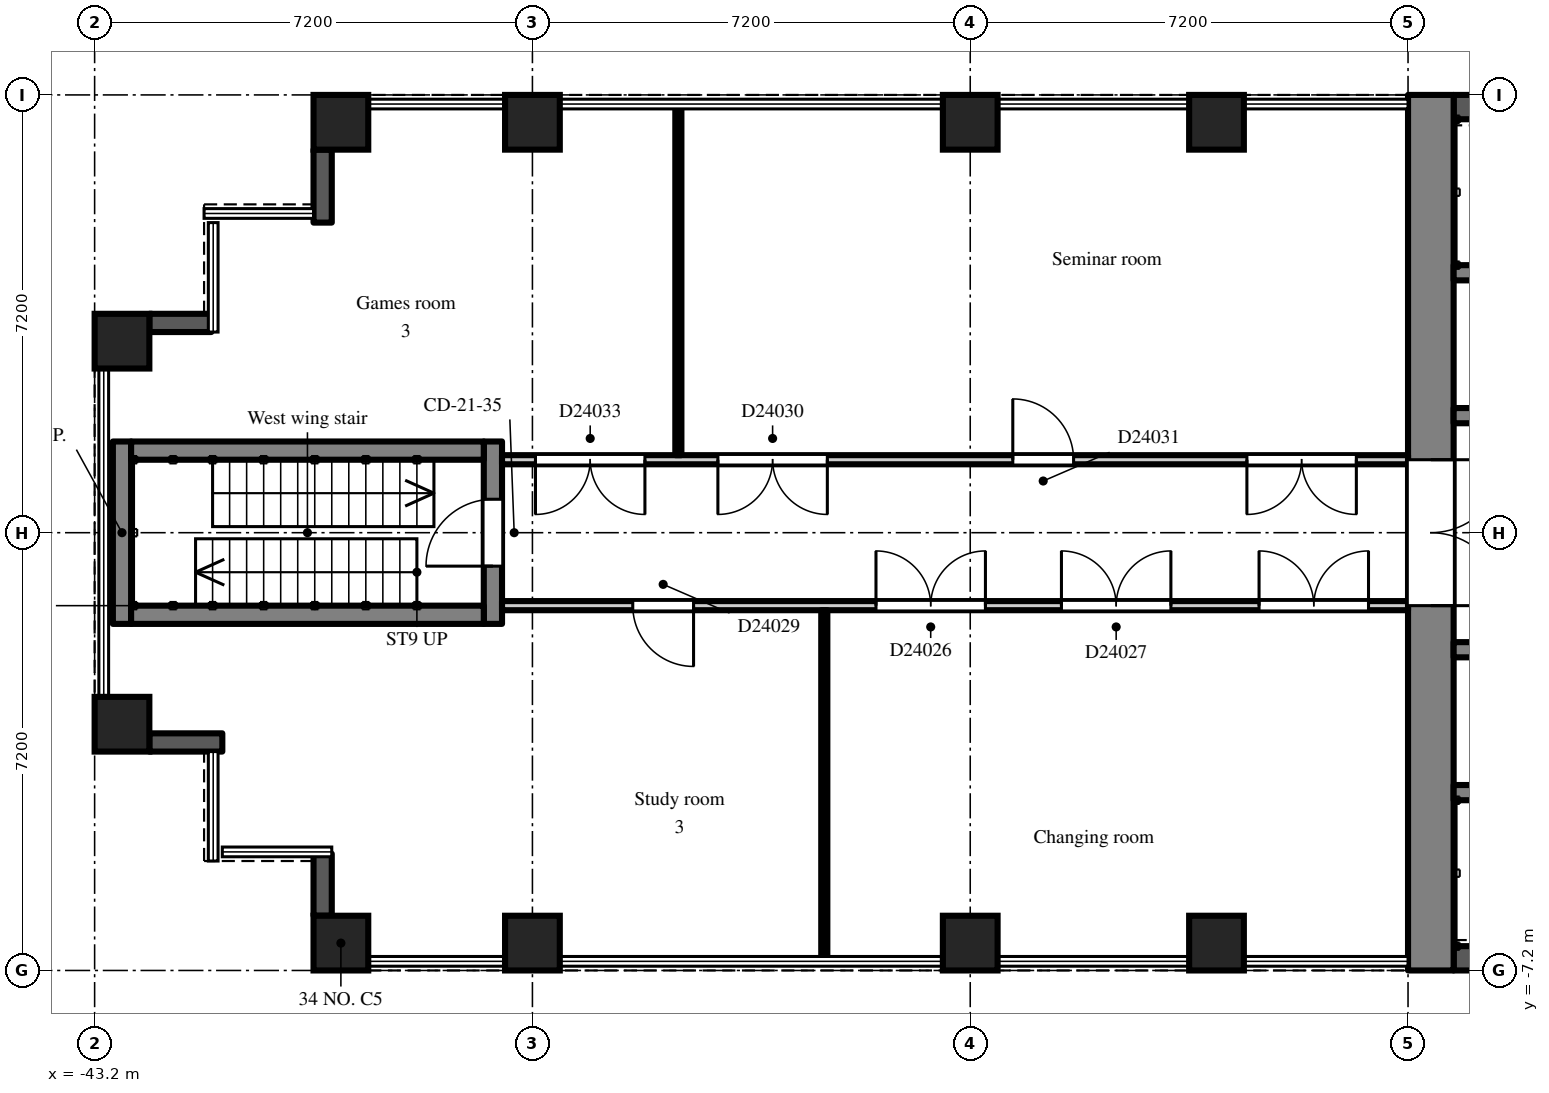
"""IFC4 building model, lengths in metres.
Left out: names, types, materials, properties, quantities, classifications, styles, units other than length and angle.
Written with IfcOpenShell. Run it as: python <this file> out.ifc"""

import sys

from ifc_helpers import new_model, si_unit, direction, frame, frame_2d, origin, origin_2d, place, context, subcontext, project, spatial, rectangle, extrude, element, fill, save


model = new_model("IFC4")
c1 = context("Model", 3, precision=1e-05, world=origin(), true_north=direction((0.0, 1.0)))
c2 = subcontext(c1, "Body", "Model", "MODEL_VIEW")
j1 = project(units=[si_unit("LENGTHUNIT", "METRE"), si_unit("PLANEANGLEUNIT", "RADIAN")], contexts=[c1])
p1 = place(None, origin())
s1 = spatial("IfcSite", under=j1, at=p1, CompositionType="ELEMENT")
p2 = place(p1, origin())
s2 = spatial("IfcBuilding", under=s1, at=p2, CompositionType="ELEMENT")
p3 = place(p2, frame((0.0, 0.0, 166.5)))
s3 = spatial("IfcBuildingStorey", under=s2, at=p3, CompositionType="ELEMENT", Elevation=166.5)
for number, where, z_axis, x_axis in (
    (1, (-42.75, -3.15, 0.0), (0.0, 0.0, 1.0), (1.0, 0.0, 0.0)),
    (2, (-42.75, 3.15, 0.0), (0.0, 0.0, 1.0), (1.0, 0.0, 0.0)),
    (3, (-39.15, -6.75, 0.0), (0.0, 0.0, 1.0), (1.0, 0.0, 0.0)),
    (4, (-39.15, 6.75, 0.0), (0.0, 0.0, 1.0), (1.0, 0.0, 0.0)),
    (5, (-36.0, -6.75, 0.0), (0.0, 0.0, 1.0), (1.0, 0.0, 0.0)),
    (6, (-36.0, 6.75, 0.0), (0.0, 0.0, 1.0), (1.0, 0.0, 0.0)),
    (7, (-28.8, -6.75, 0.0), (0.0, 0.0, 1.0), (1.0, 0.0, 0.0)),
    (8, (-28.8, 6.75, 0.0), (0.0, 0.0, 1.0), (1.0, 0.0, 0.0)),
    (9, (-24.75, -6.75, 0.0), (0.0, 0.0, 1.0), (1.0, 0.0, 0.0)),
    (10, (-24.75, 6.75, 0.0), (0.0, 0.0, 1.0), (1.0, 0.0, 0.0)),
):
    element("IfcColumn", number, at=place(p3, frame(where, z_axis=z_axis, x_axis=x_axis)), inside=s3, PredefinedType="COLUMN", context=c2, shape_type="SweptSolid", body=[
        extrude(rectangle(XDim=0.9, YDim=0.9, at=origin_2d()), origin(), (0.0, 0.0, 1.0), 4.2),
    ])
p4 = place(p3, frame((-39.45, 6.3, 0.0), z_axis=(0.0, 0.0, 1.0), x_axis=(0.0, -1.0, 0.0)))
e11 = element("IfcWall", 11, at=p4, inside=s3, PredefinedType="SOLIDWALL", context=c2, shape_type="SweptSolid", body=[
    extrude(rectangle(XDim=1.2, YDim=0.3, at=frame_2d((0.6, 0.0))), origin(), (0.0, 0.0, 1.0), 3.8),
])
p5 = place(p3, frame((-41.28, 3.45, 0.0), z_axis=(0.0, 0.0, 1.0), x_axis=(-1.0, 0.0, 0.0)))
e12 = element("IfcWall", 12, at=p5, inside=s3, PredefinedType="SOLIDWALL", context=c2, shape_type="SweptSolid", body=[
    extrude(rectangle(XDim=1.02, YDim=0.3, at=frame_2d((0.51, 0.0))), origin(), (0.0, 0.0, 1.0), 3.8),
])
p6 = place(p3, frame((-42.3, -3.45, 0.0), z_axis=(0.0, 0.0, 1.0), x_axis=(1.0, 0.0, 0.0)))
e13 = element("IfcWall", 13, at=p6, inside=s3, PredefinedType="SOLIDWALL", context=c2, shape_type="SweptSolid", body=[
    extrude(rectangle(XDim=1.2, YDim=0.3, at=frame_2d((0.6, 0.0))), origin(), (0.0, 0.0, 1.0), 3.8),
])
p7 = place(p3, frame((-39.45, -5.28, 0.0), z_axis=(0.0, 0.0, 1.0), x_axis=(0.0, -1.0, 0.0)))
e14 = element("IfcWall", 14, at=p7, inside=s3, PredefinedType="SOLIDWALL", context=c2, shape_type="SweptSolid", body=[
    extrude(rectangle(XDim=1.02, YDim=0.3, at=frame_2d((0.51, 0.0))), origin(), (0.0, 0.0, 1.0), 3.8),
])
p8 = place(p3, frame((-21.225, -7.2, 0.0), z_axis=(0.0, 0.0, 1.0), x_axis=(0.0, 1.0, 0.0)))
e15 = element("IfcWall", 15, at=p8, inside=s3, PredefinedType="SHEAR", context=c2, shape_type="SweptSolid", body=[
    extrude(rectangle(XDim=14.4, YDim=0.75, at=frame_2d((7.2, 0.0))), origin(), (0.0, 0.0, 1.0), 3.8),
])
p9 = place(p8, frame((6.0, 0.0, 0.0)))
e16 = element("IfcOpeningElement", 16, at=p9, cuts=e15, PredefinedType="OPENING", context=c2, shape_type="SweptSolid", body=[
    extrude(rectangle(XDim=2.4, YDim=2.2, at=frame_2d((1.2, 1.1))), frame((0.0, 0.385, 0.0), z_axis=(0.0, -1.0, 0.0), x_axis=(1.0, 0.0, 0.0)), (0.0, 0.0, 1.0), 0.77),
])
p10 = place(p3, frame((-7.9, 7.0, 0.0), z_axis=(0.0, 0.0, 1.0), x_axis=(-1.0, 0.0, 0.0)))
e17 = element("IfcWall", 17, at=p10, inside=s3, PredefinedType="SHEAR", context=c2, shape_type="SweptSolid", body=[
    extrude(rectangle(XDim=12.95, YDim=0.4, at=frame_2d((6.475, 0.0))), origin(), (0.0, 0.0, 1.0), 3.8),
])
p11 = place(p3, frame((-7.9, 1.925, 0.0), z_axis=(0.0, 0.0, 1.0), x_axis=(-1.0, 0.0, 0.0)))
e18 = element("IfcWall", 18, at=p11, inside=s3, PredefinedType="SHEAR", context=c2, shape_type="SweptSolid", body=[
    extrude(rectangle(XDim=12.95, YDim=0.25, at=frame_2d((6.475, 0.0))), origin(), (0.0, 0.0, 1.0), 3.8),
])
p12 = place(p11, frame((4.825, 0.0, 0.0)))
e19 = element("IfcOpeningElement", 19, at=p12, cuts=e18, PredefinedType="OPENING", context=c2, shape_type="SweptSolid", body=[
    extrude(rectangle(XDim=1.1, YDim=2.1, at=frame_2d((0.55, 1.05))), frame((0.0, 0.135, 0.0), z_axis=(0.0, -1.0, 0.0), x_axis=(1.0, 0.0, 0.0)), (0.0, 0.0, 1.0), 0.27),
])
p13 = place(p11, frame((7.025, 0.0, 0.0)))
e20 = element("IfcOpeningElement", 20, at=p13, cuts=e18, PredefinedType="OPENING", context=c2, shape_type="SweptSolid", body=[
    extrude(rectangle(XDim=1.1, YDim=2.1, at=frame_2d((0.55, 1.05))), frame((0.0, 0.135, 0.0), z_axis=(0.0, -1.0, 0.0), x_axis=(1.0, 0.0, 0.0)), (0.0, 0.0, 1.0), 0.27),
])
p14 = place(p11, frame((9.225, 0.0, 0.0)))
e21 = element("IfcOpeningElement", 21, at=p14, cuts=e18, PredefinedType="OPENING", context=c2, shape_type="SweptSolid", body=[
    extrude(rectangle(XDim=1.1, YDim=2.1, at=frame_2d((0.55, 1.05))), frame((0.0, 0.135, 0.0), z_axis=(0.0, -1.0, 0.0), x_axis=(1.0, 0.0, 0.0)), (0.0, 0.0, 1.0), 0.27),
])
p15 = place(p11, frame((0.525, 0.0, 0.0)))
e22 = element("IfcOpeningElement", 22, at=p15, cuts=e18, PredefinedType="OPENING", context=c2, shape_type="SweptSolid", body=[
    extrude(rectangle(XDim=0.9, YDim=2.1, at=frame_2d((0.45, 1.05))), frame((0.0, 0.135, 0.0), z_axis=(0.0, -1.0, 0.0), x_axis=(1.0, 0.0, 0.0)), (0.0, 0.0, 1.0), 0.27),
])
p16 = place(p11, frame((2.575, 0.0, 0.0)))
e23 = element("IfcOpeningElement", 23, at=p16, cuts=e18, PredefinedType="OPENING", context=c2, shape_type="SweptSolid", body=[
    extrude(rectangle(XDim=1.2, YDim=2.1, at=frame_2d((0.6, 1.05))), frame((0.0, 0.135, 0.0), z_axis=(0.0, -1.0, 0.0), x_axis=(1.0, 0.0, 0.0)), (0.0, 0.0, 1.0), 0.27),
])
p17 = place(p11, frame((11.525, 0.0, 0.0)))
e24 = element("IfcOpeningElement", 24, at=p17, cuts=e18, PredefinedType="OPENING", context=c2, shape_type="SweptSolid", body=[
    extrude(rectangle(XDim=0.9, YDim=2.1, at=frame_2d((0.45, 1.05))), frame((0.0, 0.135, 0.0), z_axis=(0.0, -1.0, 0.0), x_axis=(1.0, 0.0, 0.0)), (0.0, 0.0, 1.0), 0.27),
])
p18 = place(p3, frame((-12.3, 4.275, 0.0), z_axis=(0.0, 0.0, 1.0), x_axis=(-1.0, 0.0, 0.0)))
e25 = element("IfcWall", 25, at=p18, inside=s3, PredefinedType="SHEAR", context=c2, shape_type="SweptSolid", body=[
    extrude(rectangle(XDim=8.55, YDim=0.25, at=frame_2d((4.275, 0.0))), origin(), (0.0, 0.0, 1.0), 3.8),
])
p19 = place(p3, frame((-7.9, -7.0, 0.0), z_axis=(0.0, 0.0, 1.0), x_axis=(-1.0, 0.0, 0.0)))
e26 = element("IfcWall", 26, at=p19, inside=s3, PredefinedType="SHEAR", context=c2, shape_type="SweptSolid", body=[
    extrude(rectangle(XDim=12.95, YDim=0.4, at=frame_2d((6.475, 0.0))), origin(), (0.0, 0.0, 1.0), 3.8),
])
p20 = place(p3, frame((-7.9, -1.925, 0.0), z_axis=(0.0, 0.0, 1.0), x_axis=(-1.0, 0.0, 0.0)))
e27 = element("IfcWall", 27, at=p20, inside=s3, PredefinedType="SHEAR", context=c2, shape_type="SweptSolid", body=[
    extrude(rectangle(XDim=12.95, YDim=0.25, at=frame_2d((6.475, 0.0))), origin(), (0.0, 0.0, 1.0), 3.8),
])
p21 = place(p20, frame((0.525, 0.0, 0.0)))
e28 = element("IfcOpeningElement", 28, at=p21, cuts=e27, PredefinedType="OPENING", context=c2, shape_type="SweptSolid", body=[
    extrude(rectangle(XDim=0.9, YDim=2.1, at=frame_2d((0.45, 1.05))), frame((0.0, 0.135, 0.0), z_axis=(0.0, -1.0, 0.0), x_axis=(1.0, 0.0, 0.0)), (0.0, 0.0, 1.0), 0.27),
])
p22 = place(p20, frame((2.575, 0.0, 0.0)))
e29 = element("IfcOpeningElement", 29, at=p22, cuts=e27, PredefinedType="OPENING", context=c2, shape_type="SweptSolid", body=[
    extrude(rectangle(XDim=1.2, YDim=2.1, at=frame_2d((0.6, 1.05))), frame((0.0, 0.135, 0.0), z_axis=(0.0, -1.0, 0.0), x_axis=(1.0, 0.0, 0.0)), (0.0, 0.0, 1.0), 0.27),
])
p23 = place(p20, frame((4.925, 0.0, 0.0)))
e30 = element("IfcOpeningElement", 30, at=p23, cuts=e27, PredefinedType="OPENING", context=c2, shape_type="SweptSolid", body=[
    extrude(rectangle(XDim=0.9, YDim=2.1, at=frame_2d((0.45, 1.05))), frame((0.0, 0.135, 0.0), z_axis=(0.0, -1.0, 0.0), x_axis=(1.0, 0.0, 0.0)), (0.0, 0.0, 1.0), 0.27),
])
p24 = place(p20, frame((8.225, 0.0, 0.0)))
e31 = element("IfcOpeningElement", 31, at=p24, cuts=e27, PredefinedType="OPENING", context=c2, shape_type="SweptSolid", body=[
    extrude(rectangle(XDim=0.9, YDim=2.1, at=frame_2d((0.45, 1.05))), frame((0.0, 0.135, 0.0), z_axis=(0.0, -1.0, 0.0), x_axis=(1.0, 0.0, 0.0)), (0.0, 0.0, 1.0), 0.27),
])
p25 = place(p20, frame((11.525, 0.0, 0.0)))
e32 = element("IfcOpeningElement", 32, at=p25, cuts=e27, PredefinedType="OPENING", context=c2, shape_type="SweptSolid", body=[
    extrude(rectangle(XDim=0.9, YDim=2.1, at=frame_2d((0.45, 1.05))), frame((0.0, 0.135, 0.0), z_axis=(0.0, -1.0, 0.0), x_axis=(1.0, 0.0, 0.0)), (0.0, 0.0, 1.0), 0.27),
])
p26 = place(p3, frame((-12.3, -4.275, 0.0), z_axis=(0.0, 0.0, 1.0), x_axis=(-1.0, 0.0, 0.0)))
e33 = element("IfcWall", 33, at=p26, inside=s3, PredefinedType="SHEAR", context=c2, shape_type="SweptSolid", body=[
    extrude(rectangle(XDim=8.55, YDim=0.25, at=frame_2d((4.275, 0.0))), origin(), (0.0, 0.0, 1.0), 3.8),
])
p27 = place(p3, frame((-36.65, -1.5, 0.0), z_axis=(0.0, 0.0, 1.0), x_axis=(0.0, 1.0, 0.0)))
e34 = element("IfcWall", 34, at=p27, inside=s3, PredefinedType="SHEAR", context=c2, shape_type="SweptSolid", body=[
    extrude(rectangle(XDim=3.0, YDim=0.3, at=frame_2d((1.5, 0.0))), origin(), (0.0, 0.0, 1.0), 3.8),
])
p28 = place(p27, frame((0.95, 0.0, 0.0)))
e35 = element("IfcOpeningElement", 35, at=p28, cuts=e34, PredefinedType="OPENING", context=c2, shape_type="SweptSolid", body=[
    extrude(rectangle(XDim=1.1, YDim=2.1, at=frame_2d((0.55, 1.05))), frame((0.0, 0.16, 0.0), z_axis=(0.0, -1.0, 0.0), x_axis=(1.0, 0.0, 0.0)), (0.0, 0.0, 1.0), 0.32),
])
p29 = place(p3, frame((-42.75, -1.5, 0.0), z_axis=(0.0, 0.0, 1.0), x_axis=(0.0, 1.0, 0.0)))
e36 = element("IfcWall", 36, at=p29, inside=s3, PredefinedType="SHEAR", context=c2, shape_type="SweptSolid", body=[
    extrude(rectangle(XDim=3.0, YDim=0.3, at=frame_2d((1.5, 0.0))), origin(), (0.0, 0.0, 1.0), 3.8),
])
for number, where, z_axis, x_axis in (
    (37, (-36.8, -1.35, 0.0), (0.0, 0.0, 1.0), (-1.0, 0.0, 0.0)),
    (38, (-36.8, 1.35, 0.0), (0.0, 0.0, 1.0), (-1.0, 0.0, 0.0)),
):
    element("IfcWall", number, at=place(p3, frame(where, z_axis=z_axis, x_axis=x_axis)), inside=s3, PredefinedType="SHEAR", context=c2, shape_type="SweptSolid", body=[
        extrude(rectangle(XDim=5.8, YDim=0.3, at=frame_2d((2.9, 0.0))), origin(), (0.0, 0.0, 1.0), 3.8),
    ])
p30 = place(p3, frame((-36.5, -1.2, 0.0), z_axis=(0.0, 0.0, 1.0), x_axis=(1.0, 0.0, 0.0)))
e39 = element("IfcWall", 39, at=p30, inside=s3, PredefinedType="PARTITIONING", context=c2, shape_type="SweptSolid", body=[
    extrude(rectangle(XDim=14.9, YDim=0.15, at=frame_2d((7.45, 0.0))), origin(), (0.0, 0.0, 1.0), 3.8),
])
p31 = place(p30, frame((6.15, 0.0, 0.0)))
e40 = element("IfcOpeningElement", 40, at=p31, cuts=e39, PredefinedType="OPENING", context=c2, shape_type="SweptSolid", body=[
    extrude(rectangle(XDim=1.8, YDim=2.1, at=frame_2d((0.9, 1.05))), frame((0.0, 0.085, 0.0), z_axis=(0.0, -1.0, 0.0), x_axis=(1.0, 0.0, 0.0)), (0.0, 0.0, 1.0), 0.17),
])
p32 = place(p30, frame((9.2, 0.0, 0.0)))
e41 = element("IfcOpeningElement", 41, at=p32, cuts=e39, PredefinedType="OPENING", context=c2, shape_type="SweptSolid", body=[
    extrude(rectangle(XDim=1.8, YDim=2.1, at=frame_2d((0.9, 1.05))), frame((0.0, 0.085, 0.0), z_axis=(0.0, -1.0, 0.0), x_axis=(1.0, 0.0, 0.0)), (0.0, 0.0, 1.0), 0.17),
])
p33 = place(p30, frame((12.45, 0.0, 0.0)))
e42 = element("IfcOpeningElement", 42, at=p33, cuts=e39, PredefinedType="OPENING", context=c2, shape_type="SweptSolid", body=[
    extrude(rectangle(XDim=1.8, YDim=2.1, at=frame_2d((0.9, 1.05))), frame((0.0, 0.085, 0.0), z_axis=(0.0, -1.0, 0.0), x_axis=(1.0, 0.0, 0.0)), (0.0, 0.0, 1.0), 0.17),
])
p34 = place(p30, frame((2.15, 0.0, 0.0)))
e43 = element("IfcOpeningElement", 43, at=p34, cuts=e39, PredefinedType="OPENING", context=c2, shape_type="SweptSolid", body=[
    extrude(rectangle(XDim=1.0, YDim=2.1, at=frame_2d((0.5, 1.05))), frame((0.0, 0.085, 0.0), z_axis=(0.0, -1.0, 0.0), x_axis=(1.0, 0.0, 0.0)), (0.0, 0.0, 1.0), 0.17),
])
p35 = place(p3, frame((-36.5, 1.2, 0.0), z_axis=(0.0, 0.0, 1.0), x_axis=(1.0, 0.0, 0.0)))
e44 = element("IfcWall", 44, at=p35, inside=s3, PredefinedType="PARTITIONING", context=c2, shape_type="SweptSolid", body=[
    extrude(rectangle(XDim=14.9, YDim=0.15, at=frame_2d((7.45, 0.0))), origin(), (0.0, 0.0, 1.0), 3.8),
])
p36 = place(p35, frame((3.55, 0.0, 0.0)))
e45 = element("IfcOpeningElement", 45, at=p36, cuts=e44, PredefinedType="OPENING", context=c2, shape_type="SweptSolid", body=[
    extrude(rectangle(XDim=1.8, YDim=2.1, at=frame_2d((0.9, 1.05))), frame((0.0, 0.085, 0.0), z_axis=(0.0, -1.0, 0.0), x_axis=(1.0, 0.0, 0.0)), (0.0, 0.0, 1.0), 0.17),
])
p37 = place(p35, frame((8.4, 0.0, 0.0)))
e46 = element("IfcOpeningElement", 46, at=p37, cuts=e44, PredefinedType="OPENING", context=c2, shape_type="SweptSolid", body=[
    extrude(rectangle(XDim=1.0, YDim=2.1, at=frame_2d((0.5, 1.05))), frame((0.0, 0.085, 0.0), z_axis=(0.0, -1.0, 0.0), x_axis=(1.0, 0.0, 0.0)), (0.0, 0.0, 1.0), 0.17),
])
p38 = place(p35, frame((12.25, 0.0, 0.0)))
e47 = element("IfcOpeningElement", 47, at=p38, cuts=e44, PredefinedType="OPENING", context=c2, shape_type="SweptSolid", body=[
    extrude(rectangle(XDim=1.8, YDim=2.1, at=frame_2d((0.9, 1.05))), frame((0.0, 0.085, 0.0), z_axis=(0.0, -1.0, 0.0), x_axis=(1.0, 0.0, 0.0)), (0.0, 0.0, 1.0), 0.17),
])
p39 = place(p35, frame((0.55, 0.0, 0.0)))
e48 = element("IfcOpeningElement", 48, at=p39, cuts=e44, PredefinedType="OPENING", context=c2, shape_type="SweptSolid", body=[
    extrude(rectangle(XDim=1.8, YDim=2.1, at=frame_2d((0.9, 1.05))), frame((0.0, 0.085, 0.0), z_axis=(0.0, -1.0, 0.0), x_axis=(1.0, 0.0, 0.0)), (0.0, 0.0, 1.0), 0.17),
])
for number, where, z_axis, x_axis in (
    (49, (-33.6, 1.275, 0.0), (0.0, 0.0, 1.0), (0.0, 1.0, 0.0)),
    (50, (-31.2, -7.02, 0.0), (0.0, 0.0, 1.0), (0.0, 1.0, 0.0)),
):
    element("IfcWall", number, at=place(p3, frame(where, z_axis=z_axis, x_axis=x_axis)), inside=s3, PredefinedType="PARTITIONING", context=c2, shape_type="SweptSolid", body=[
        extrude(rectangle(XDim=5.745, YDim=0.1, at=frame_2d((2.873, 0.0))), origin(), (0.0, 0.0, 1.0), 3.8),
    ])
p40 = place(p9, frame((2.4, 0.0, 0.0), z_axis=(0.0, 0.0, 1.0), x_axis=(-1.0, 0.0, 0.0)))
e51 = element("IfcDoor", 51, at=p40, inside=s3, OperationType="DOUBLE_DOOR_DOUBLE_SWING", PredefinedType="DOOR", context=c2, shape_type="SweptSolid", body=[
    extrude(rectangle(XDim=2.4, YDim=2.2, at=frame_2d((1.2, 1.1))), frame((0.0, 0.025, 0.0), z_axis=(0.0, -1.0, 0.0), x_axis=(1.0, 0.0, 0.0)), (0.0, 0.0, 1.0), 0.05),
])
fill(e16, e51)
p41 = place(p28, origin())
e52 = element("IfcDoor", 52, at=p41, inside=s3, OperationType="SINGLE_SWING_LEFT", PredefinedType="DOOR", context=c2, shape_type="SweptSolid", body=[
    extrude(rectangle(XDim=1.1, YDim=2.1, at=frame_2d((0.55, 1.05))), frame((0.0, 0.025, 0.0), z_axis=(0.0, -1.0, 0.0), x_axis=(1.0, 0.0, 0.0)), (0.0, 0.0, 1.0), 0.05),
])
fill(e35, e52)
p42 = place(p31, origin())
e53 = element("IfcDoor", 53, at=p42, inside=s3, OperationType="DOUBLE_DOOR_DOUBLE_SWING", PredefinedType="DOOR", context=c2, shape_type="SweptSolid", body=[
    extrude(rectangle(XDim=1.8, YDim=2.1, at=frame_2d((0.9, 1.05))), frame((0.0, 0.025, 0.0), z_axis=(0.0, -1.0, 0.0), x_axis=(1.0, 0.0, 0.0)), (0.0, 0.0, 1.0), 0.05),
])
fill(e40, e53)
p43 = place(p32, origin())
e54 = element("IfcDoor", 54, at=p43, inside=s3, OperationType="DOUBLE_DOOR_DOUBLE_SWING", PredefinedType="DOOR", context=c2, shape_type="SweptSolid", body=[
    extrude(rectangle(XDim=1.8, YDim=2.1, at=frame_2d((0.9, 1.05))), frame((0.0, 0.025, 0.0), z_axis=(0.0, -1.0, 0.0), x_axis=(1.0, 0.0, 0.0)), (0.0, 0.0, 1.0), 0.05),
])
fill(e41, e54)
p44 = place(p33, origin())
e55 = element("IfcDoor", 55, at=p44, inside=s3, OperationType="DOUBLE_DOOR_DOUBLE_SWING", PredefinedType="DOOR", context=c2, shape_type="SweptSolid", body=[
    extrude(rectangle(XDim=1.8, YDim=2.1, at=frame_2d((0.9, 1.05))), frame((0.0, 0.025, 0.0), z_axis=(0.0, -1.0, 0.0), x_axis=(1.0, 0.0, 0.0)), (0.0, 0.0, 1.0), 0.05),
])
fill(e42, e55)
p45 = place(p34, frame((1.0, 0.0, 0.0), z_axis=(0.0, 0.0, 1.0), x_axis=(-1.0, 0.0, 0.0)))
e56 = element("IfcDoor", 56, at=p45, inside=s3, OperationType="SINGLE_SWING_LEFT", PredefinedType="DOOR", context=c2, shape_type="SweptSolid", body=[
    extrude(rectangle(XDim=1.0, YDim=2.1, at=frame_2d((0.5, 1.05))), frame((0.0, 0.025, 0.0), z_axis=(0.0, -1.0, 0.0), x_axis=(1.0, 0.0, 0.0)), (0.0, 0.0, 1.0), 0.05),
])
fill(e43, e56)
p46 = place(p36, frame((1.8, 0.0, 0.0), z_axis=(0.0, 0.0, 1.0), x_axis=(-1.0, 0.0, 0.0)))
e57 = element("IfcDoor", 57, at=p46, inside=s3, OperationType="DOUBLE_DOOR_DOUBLE_SWING", PredefinedType="DOOR", context=c2, shape_type="SweptSolid", body=[
    extrude(rectangle(XDim=1.8, YDim=2.1, at=frame_2d((0.9, 1.05))), frame((0.0, 0.025, 0.0), z_axis=(0.0, -1.0, 0.0), x_axis=(1.0, 0.0, 0.0)), (0.0, 0.0, 1.0), 0.05),
])
fill(e45, e57)
p47 = place(p37, origin())
e58 = element("IfcDoor", 58, at=p47, inside=s3, OperationType="SINGLE_SWING_LEFT", PredefinedType="DOOR", context=c2, shape_type="SweptSolid", body=[
    extrude(rectangle(XDim=1.0, YDim=2.1, at=frame_2d((0.5, 1.05))), frame((0.0, 0.025, 0.0), z_axis=(0.0, -1.0, 0.0), x_axis=(1.0, 0.0, 0.0)), (0.0, 0.0, 1.0), 0.05),
])
fill(e46, e58)
p48 = place(p38, frame((1.8, 0.0, 0.0), z_axis=(0.0, 0.0, 1.0), x_axis=(-1.0, 0.0, 0.0)))
e59 = element("IfcDoor", 59, at=p48, inside=s3, OperationType="DOUBLE_DOOR_DOUBLE_SWING", PredefinedType="DOOR", context=c2, shape_type="SweptSolid", body=[
    extrude(rectangle(XDim=1.8, YDim=2.1, at=frame_2d((0.9, 1.05))), frame((0.0, 0.025, 0.0), z_axis=(0.0, -1.0, 0.0), x_axis=(1.0, 0.0, 0.0)), (0.0, 0.0, 1.0), 0.05),
])
fill(e47, e59)
p49 = place(p39, frame((1.8, 0.0, 0.0), z_axis=(0.0, 0.0, 1.0), x_axis=(-1.0, 0.0, 0.0)))
e60 = element("IfcDoor", 60, at=p49, inside=s3, OperationType="DOUBLE_DOOR_DOUBLE_SWING", PredefinedType="DOOR", context=c2, shape_type="SweptSolid", body=[
    extrude(rectangle(XDim=1.8, YDim=2.1, at=frame_2d((0.9, 1.05))), frame((0.0, 0.025, 0.0), z_axis=(0.0, -1.0, 0.0), x_axis=(1.0, 0.0, 0.0)), (0.0, 0.0, 1.0), 0.05),
])
fill(e48, e60)
save(model, sys.argv[1])
